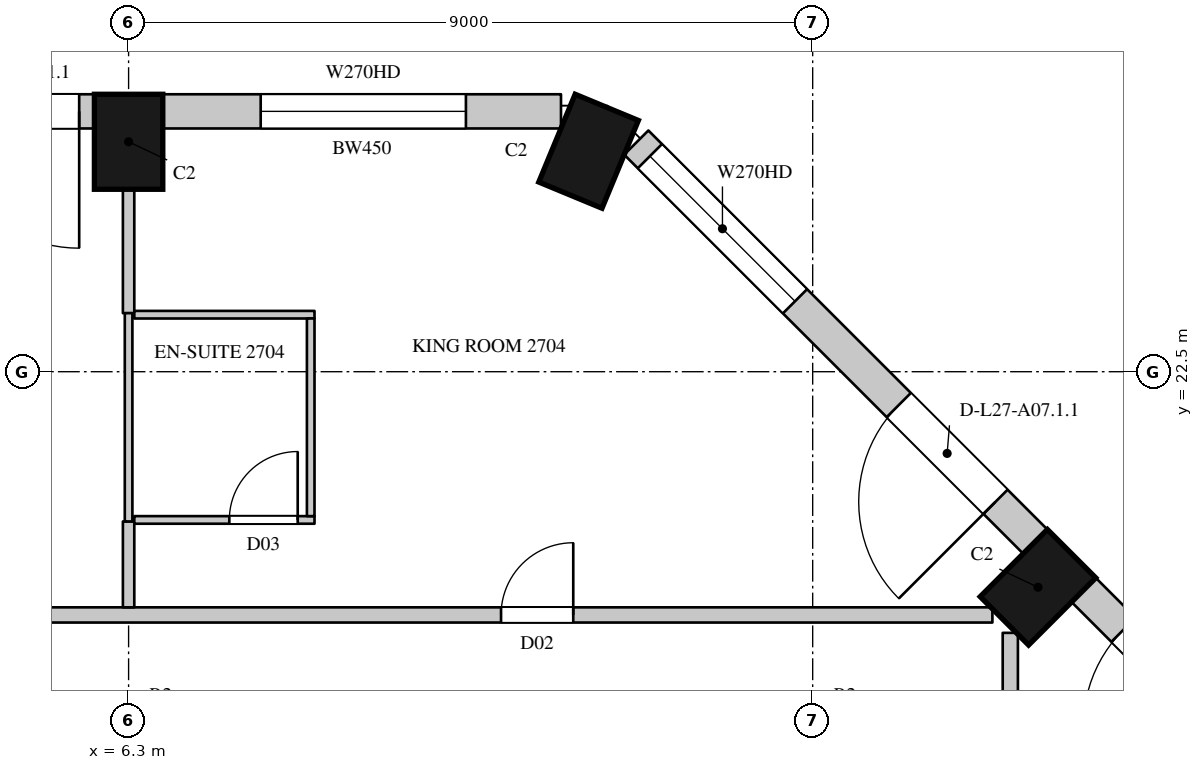
"""IFC4 building model, lengths in metres.
Left out: names, types, materials, properties, quantities, classifications, styles, units other than length and angle.
Written with IfcOpenShell. Run it as: python <this file> out.ifc"""

import sys

from ifc_helpers import new_model, si_unit, direction, frame, frame_2d, origin, origin_2d, place, context, subcontext, project, spatial, rectangle, extrude, element, fill, save


model = new_model("IFC4")
c1 = context("Model", 3, precision=1e-05, world=origin(), true_north=direction((0.0, 1.0)))
c2 = subcontext(c1, "Body", "Model", "MODEL_VIEW")
j1 = project(units=[si_unit("LENGTHUNIT", "METRE"), si_unit("PLANEANGLEUNIT", "RADIAN")], contexts=[c1])
p1 = place(None, origin())
s1 = spatial("IfcSite", under=j1, at=p1, CompositionType="ELEMENT")
p2 = place(p1, origin())
s2 = spatial("IfcBuilding", under=s1, at=p2, CompositionType="ELEMENT")
p3 = place(p2, frame((0.0, 0.0, 127.5)))
s3 = spatial("IfcBuildingStorey", under=s2, at=p3, CompositionType="ELEMENT", Elevation=127.5)
for number, where, z_axis, x_axis in (
    (1, (18.264, 19.664, 0.0), (0.0, 0.0, 1.0), (-0.707, 0.707, 0.0)),
    (2, (12.352, 25.4, 0.0), (0.0, 0.0, 1.0), (-0.924, 0.383, 0.0)),
    (3, (6.3, 25.525, 0.0), (0.0, 0.0, 1.0), (-1.0, 0.0, 0.0)),
):
    element("IfcColumn", number, at=place(p3, frame(where, z_axis=z_axis, x_axis=x_axis)), inside=s3, PredefinedType="COLUMN", context=c2, shape_type="SweptSolid", body=[
        extrude(rectangle(XDim=0.9, YDim=1.25, at=origin_2d()), origin(), (0.0, 0.0, 1.0), 3.6),
    ])
p4 = place(p3, frame((24.115, 14.379, 0.0), z_axis=(0.0, 0.0, 1.0), x_axis=(-0.707106781187, 0.707106781187, 0.0)))
e4 = element("IfcWall", 4, at=p4, inside=s3, PredefinedType="SOLIDWALL", context=c2, shape_type="SweptSolid", body=[
    extrude(rectangle(XDim=7.424, YDim=0.45, at=frame_2d((3.712, 0.0))), origin(), (0.0, 0.0, 1.0), 3.3),
])
p5 = place(p4, frame((0.253, 0.0, 1.05)))
e5 = element("IfcOpeningElement", 5, at=p5, cuts=e4, PredefinedType="OPENING", context=c2, shape_type="SweptSolid", body=[
    extrude(rectangle(XDim=2.7, YDim=2.0, at=frame_2d((1.35, 1.0))), frame((0.0, 0.235, 0.0), z_axis=(0.0, -1.0, 0.0), x_axis=(1.0, 0.0, 0.0)), (0.0, 0.0, 1.0), 0.47),
])
p6 = place(p4, frame((4.884, 0.0, 0.0)))
e6 = element("IfcOpeningElement", 6, at=p6, cuts=e4, PredefinedType="OPENING", context=c2, shape_type="SweptSolid", body=[
    extrude(rectangle(XDim=1.8, YDim=2.4, at=frame_2d((0.9, 1.2))), frame((0.0, 0.235, 0.0), z_axis=(0.0, -1.0, 0.0), x_axis=(1.0, 0.0, 0.0)), (0.0, 0.0, 1.0), 0.47),
])
p7 = place(p3, frame((18.229, 20.265, 0.0), z_axis=(0.0, 0.0, 1.0), x_axis=(-0.707106781187, 0.707106781187, 0.0)))
e7 = element("IfcWall", 7, at=p7, inside=s3, PredefinedType="SOLIDWALL", context=c2, shape_type="SweptSolid", body=[
    extrude(rectangle(XDim=7.424, YDim=0.45, at=frame_2d((3.712, 0.0))), origin(), (0.0, 0.0, 1.0), 3.3),
])
p8 = place(p7, frame((0.74, 0.0, 0.0)))
e8 = element("IfcOpeningElement", 8, at=p8, cuts=e7, PredefinedType="OPENING", context=c2, shape_type="SweptSolid", body=[
    extrude(rectangle(XDim=1.8, YDim=2.4, at=frame_2d((0.9, 1.2))), frame((0.0, 0.235, 0.0), z_axis=(0.0, -1.0, 0.0), x_axis=(1.0, 0.0, 0.0)), (0.0, 0.0, 1.0), 0.47),
])
p9 = place(p7, frame((4.471, 0.0, 1.05)))
e9 = element("IfcOpeningElement", 9, at=p9, cuts=e7, PredefinedType="OPENING", context=c2, shape_type="SweptSolid", body=[
    extrude(rectangle(XDim=2.7, YDim=2.0, at=frame_2d((1.35, 1.0))), frame((0.0, 0.235, 0.0), z_axis=(0.0, -1.0, 0.0), x_axis=(1.0, 0.0, 0.0)), (0.0, 0.0, 1.0), 0.47),
])
p10 = place(p3, frame((11.989, 25.925, 0.0), z_axis=(0.0, 0.0, 1.0), x_axis=(-1.0, 0.0, 0.0)))
e10 = element("IfcWall", 10, at=p10, inside=s3, PredefinedType="SOLIDWALL", context=c2, shape_type="SweptSolid", body=[
    extrude(rectangle(XDim=5.239, YDim=0.45, at=frame_2d((2.619, 0.0))), origin(), (0.0, 0.0, 1.0), 3.3),
])
p11 = place(p10, frame((1.251, 0.0, 1.05)))
e11 = element("IfcOpeningElement", 11, at=p11, cuts=e10, PredefinedType="OPENING", context=c2, shape_type="SweptSolid", body=[
    extrude(rectangle(XDim=2.7, YDim=2.0, at=frame_2d((1.35, 1.0))), frame((0.0, 0.235, 0.0), z_axis=(0.0, -1.0, 0.0), x_axis=(1.0, 0.0, 0.0)), (0.0, 0.0, 1.0), 0.47),
])
p12 = place(p3, frame((5.85, 25.925, 0.0), z_axis=(0.0, 0.0, 1.0), x_axis=(-1.0, 0.0, 0.0)))
e12 = element("IfcWall", 12, at=p12, inside=s3, PredefinedType="SOLIDWALL", context=c2, shape_type="SweptSolid", body=[
    extrude(rectangle(XDim=8.1, YDim=0.45, at=frame_2d((4.05, 0.0))), origin(), (0.0, 0.0, 1.0), 3.3),
])
p13 = place(p12, frame((0.2, 0.0, 0.0)))
e13 = element("IfcOpeningElement", 13, at=p13, cuts=e12, PredefinedType="OPENING", context=c2, shape_type="SweptSolid", body=[
    extrude(rectangle(XDim=1.8, YDim=2.4, at=frame_2d((0.9, 1.2))), frame((0.0, 0.235, 0.0), z_axis=(0.0, -1.0, 0.0), x_axis=(1.0, 0.0, 0.0)), (0.0, 0.0, 1.0), 0.47),
])
p14 = place(p12, frame((2.2, 0.0, 1.05)))
e14 = element("IfcOpeningElement", 14, at=p14, cuts=e12, PredefinedType="OPENING", context=c2, shape_type="SweptSolid", body=[
    extrude(rectangle(XDim=1.2, YDim=2.0, at=frame_2d((0.6, 1.0))), frame((0.0, 0.235, 0.0), z_axis=(0.0, -1.0, 0.0), x_axis=(1.0, 0.0, 0.0)), (0.0, 0.0, 1.0), 0.47),
])
p15 = place(p12, frame((4.7, 0.0, 0.0)))
e15 = element("IfcOpeningElement", 15, at=p15, cuts=e12, PredefinedType="OPENING", context=c2, shape_type="SweptSolid", body=[
    extrude(rectangle(XDim=1.8, YDim=2.4, at=frame_2d((0.9, 1.2))), frame((0.0, 0.235, 0.0), z_axis=(0.0, -1.0, 0.0), x_axis=(1.0, 0.0, 0.0)), (0.0, 0.0, 1.0), 0.47),
])
p16 = place(p12, frame((6.7, 0.0, 1.05)))
e16 = element("IfcOpeningElement", 16, at=p16, cuts=e12, PredefinedType="OPENING", context=c2, shape_type="SweptSolid", body=[
    extrude(rectangle(XDim=1.2, YDim=2.0, at=frame_2d((0.6, 1.0))), frame((0.0, 0.235, 0.0), z_axis=(0.0, -1.0, 0.0), x_axis=(1.0, 0.0, 0.0)), (0.0, 0.0, 1.0), 0.47),
])
p17 = place(p3, frame((19.937, 20.078, 0.0), z_axis=(0.0, 0.0, 1.0), x_axis=(-0.707106781187, 0.707106781187, 0.0)))
e17 = element("IfcWall", 17, at=p17, inside=s3, PredefinedType="SOLIDWALL", context=c2, shape_type="SweptSolid", body=[
    extrude(rectangle(XDim=1.781, YDim=0.45, at=frame_2d((0.89, 0.0))), origin(), (0.0, 0.0, 1.0), 0.6),
])
p18 = place(p3, frame((16.486, 23.529, 0.0), z_axis=(0.0, 0.0, 1.0), x_axis=(-0.707022305137, 0.707191247145, 0.0)))
e18 = element("IfcWall", 18, at=p18, inside=s3, PredefinedType="SOLIDWALL", context=c2, shape_type="SweptSolid", body=[
    extrude(rectangle(XDim=1.445, YDim=0.45, at=frame_2d((0.723, 0.0))), origin(), (0.0, 0.0, 1.0), 0.6),
])
p19 = place(p3, frame((-20.8, 19.3, 0.0), z_axis=(0.0, 0.0, 1.0), x_axis=(1.0, 0.0, 0.0)))
e19 = element("IfcWall", 19, at=p19, inside=s3, PredefinedType="PARTITIONING", context=c2, shape_type="SweptSolid", body=[
    extrude(rectangle(XDim=38.464, YDim=0.2, at=frame_2d((19.232, 0.0))), origin(), (0.0, 0.0, 1.0), 3.3),
])
p20 = place(p19, frame((24.05, 0.0, 0.0)))
e20 = element("IfcOpeningElement", 20, at=p20, cuts=e19, PredefinedType="OPENING", context=c2, shape_type="SweptSolid", body=[
    extrude(rectangle(XDim=0.9, YDim=2.2, at=frame_2d((0.45, 1.1))), frame((0.0, 0.11, 0.0), z_axis=(0.0, -1.0, 0.0), x_axis=(1.0, 0.0, 0.0)), (0.0, 0.0, 1.0), 0.22),
])
p21 = place(p19, frame((11.2, 0.0, 0.0)))
e21 = element("IfcOpeningElement", 21, at=p21, cuts=e19, PredefinedType="OPENING", context=c2, shape_type="SweptSolid", body=[
    extrude(rectangle(XDim=0.95, YDim=2.2, at=frame_2d((0.475, 1.1))), frame((0.0, 0.11, 0.0), z_axis=(0.0, -1.0, 0.0), x_axis=(1.0, 0.0, 0.0)), (0.0, 0.0, 1.0), 0.22),
])
p22 = place(p19, frame((15.05, 0.0, 0.0)))
e22 = element("IfcOpeningElement", 22, at=p22, cuts=e19, PredefinedType="OPENING", context=c2, shape_type="SweptSolid", body=[
    extrude(rectangle(XDim=0.95, YDim=2.2, at=frame_2d((0.475, 1.1))), frame((0.0, 0.11, 0.0), z_axis=(0.0, -1.0, 0.0), x_axis=(1.0, 0.0, 0.0)), (0.0, 0.0, 1.0), 0.22),
])
p23 = place(p19, frame((32.0, 0.0, 0.0)))
e23 = element("IfcOpeningElement", 23, at=p23, cuts=e19, PredefinedType="OPENING", context=c2, shape_type="SweptSolid", body=[
    extrude(rectangle(XDim=0.95, YDim=2.2, at=frame_2d((0.475, 1.1))), frame((0.0, 0.11, 0.0), z_axis=(0.0, -1.0, 0.0), x_axis=(1.0, 0.0, 0.0)), (0.0, 0.0, 1.0), 0.22),
])
p24 = place(p3, frame((17.9, 4.75, 0.0), z_axis=(0.0, 0.0, 1.0), x_axis=(0.0, 1.0, 0.0)))
e24 = element("IfcWall", 24, at=p24, inside=s3, PredefinedType="PARTITIONING", context=c2, shape_type="SweptSolid", body=[
    extrude(rectangle(XDim=14.314, YDim=0.2, at=frame_2d((7.157, 0.0))), origin(), (0.0, 0.0, 1.0), 3.3),
])
p25 = place(p24, frame((1.7, 0.0, 0.0)))
e25 = element("IfcOpeningElement", 25, at=p25, cuts=e24, PredefinedType="OPENING", context=c2, shape_type="SweptSolid", body=[
    extrude(rectangle(XDim=0.9, YDim=2.2, at=frame_2d((0.45, 1.1))), frame((0.0, 0.11, 0.0), z_axis=(0.0, -1.0, 0.0), x_axis=(1.0, 0.0, 0.0)), (0.0, 0.0, 1.0), 0.22),
])
p26 = place(p24, frame((10.2, 0.0, 0.0)))
e26 = element("IfcOpeningElement", 26, at=p26, cuts=e24, PredefinedType="OPENING", context=c2, shape_type="SweptSolid", body=[
    extrude(rectangle(XDim=0.95, YDim=2.2, at=frame_2d((0.475, 1.1))), frame((0.0, 0.11, 0.0), z_axis=(0.0, -1.0, 0.0), x_axis=(1.0, 0.0, 0.0)), (0.0, 0.0, 1.0), 0.22),
])
p27 = place(p3, frame((6.3, 19.4, 0.0), z_axis=(0.0, 0.0, 1.0), x_axis=(0.0, 1.0, 0.0)))
e27 = element("IfcWall", 27, at=p27, inside=s3, PredefinedType="PARTITIONING", context=c2, shape_type="SweptSolid", body=[
    extrude(rectangle(XDim=1.13, YDim=0.15, at=frame_2d((0.565, 0.0))), origin(), (0.0, 0.0, 1.0), 2.75),
])
p28 = place(p3, frame((6.3, 23.27, 0.0), z_axis=(0.0, 0.0, 1.0), x_axis=(0.0, 1.0, 0.0)))
e28 = element("IfcWall", 28, at=p28, inside=s3, PredefinedType="PARTITIONING", context=c2, shape_type="SweptSolid", body=[
    extrude(rectangle(XDim=1.63, YDim=0.15, at=frame_2d((0.815, 0.0))), origin(), (0.0, 0.0, 1.0), 2.75),
])
p29 = place(p3, frame((6.3, 20.53, 0.0), z_axis=(0.0, 0.0, 1.0), x_axis=(0.0, 1.0, 0.0)))
e29 = element("IfcWall", 29, at=p29, inside=s3, PredefinedType="PARTITIONING", context=c2, shape_type="SweptSolid", body=[
    extrude(rectangle(XDim=2.74, YDim=0.1, at=frame_2d((1.37, 0.0))), origin(), (0.0, 0.0, 1.0), 2.75),
])
p30 = place(p3, frame((6.375, 20.55, 0.0), z_axis=(0.0, 0.0, 1.0), x_axis=(1.0, 0.0, 0.0)))
e30 = element("IfcWall", 30, at=p30, inside=s3, PredefinedType="PARTITIONING", context=c2, shape_type="SweptSolid", body=[
    extrude(rectangle(XDim=2.371, YDim=0.1, at=frame_2d((1.186, 0.0))), origin(), (0.0, 0.0, 1.0), 3.3),
])
p31 = place(p30, frame((1.25, 0.0, 0.0)))
e31 = element("IfcOpeningElement", 31, at=p31, cuts=e30, PredefinedType="OPENING", context=c2, shape_type="SweptSolid", body=[
    extrude(rectangle(XDim=0.9, YDim=2.2, at=frame_2d((0.45, 1.1))), frame((0.0, 0.06, 0.0), z_axis=(0.0, -1.0, 0.0), x_axis=(1.0, 0.0, 0.0)), (0.0, 0.0, 1.0), 0.12),
])
p32 = place(p3, frame((6.375, 23.25, 0.0), z_axis=(0.0, 0.0, 1.0), x_axis=(1.0, 0.0, 0.0)))
e32 = element("IfcWall", 32, at=p32, inside=s3, PredefinedType="PARTITIONING", context=c2, shape_type="SweptSolid", body=[
    extrude(rectangle(XDim=2.371, YDim=0.1, at=frame_2d((1.186, 0.0))), origin(), (0.0, 0.0, 1.0), 3.3),
])
p33 = place(p3, frame((8.696, 20.6, 0.0), z_axis=(0.0, 0.0, 1.0), x_axis=(0.0, 1.0, 0.0)))
e33 = element("IfcWall", 33, at=p33, inside=s3, PredefinedType="PARTITIONING", context=c2, shape_type="SweptSolid", body=[
    extrude(rectangle(XDim=2.6, YDim=0.1, at=frame_2d((1.3, 0.0))), origin(), (0.0, 0.0, 1.0), 3.3),
])
p34 = place(p6, origin())
e34 = element("IfcDoor", 34, at=p34, inside=s3, OperationType="SLIDING_TO_LEFT", PredefinedType="DOOR", context=c2, shape_type="SweptSolid", body=[
    extrude(rectangle(XDim=1.8, YDim=2.4, at=frame_2d((0.9, 1.2))), frame((0.0, 0.13, 0.0), z_axis=(0.0, -1.0, 0.0), x_axis=(1.0, 0.0, 0.0)), (0.0, 0.0, 1.0), 0.05),
])
fill(e6, e34)
p35 = place(p8, origin())
e35 = element("IfcDoor", 35, at=p35, inside=s3, OperationType="SLIDING_TO_LEFT", PredefinedType="DOOR", context=c2, shape_type="SweptSolid", body=[
    extrude(rectangle(XDim=1.8, YDim=2.4, at=frame_2d((0.9, 1.2))), frame((0.0, 0.13, 0.0), z_axis=(0.0, -1.0, 0.0), x_axis=(1.0, 0.0, 0.0)), (0.0, 0.0, 1.0), 0.05),
])
fill(e8, e35)
p36 = place(p9, origin())
e36 = element("IfcWindow", 36, at=p36, inside=s3, PartitioningType="SINGLE_PANEL", PredefinedType="WINDOW", context=c2, shape_type="SweptSolid", body=[
    extrude(rectangle(XDim=2.7, YDim=2.0, at=frame_2d((1.35, 1.0))), frame((0.0, 0.135, 0.0), z_axis=(0.0, -1.0, 0.0), x_axis=(1.0, 0.0, 0.0)), (0.0, 0.0, 1.0), 0.06),
])
fill(e9, e36)
p37 = place(p11, origin())
e37 = element("IfcWindow", 37, at=p37, inside=s3, PartitioningType="SINGLE_PANEL", PredefinedType="WINDOW", context=c2, shape_type="SweptSolid", body=[
    extrude(rectangle(XDim=2.7, YDim=2.0, at=frame_2d((1.35, 1.0))), frame((0.0, 0.135, 0.0), z_axis=(0.0, -1.0, 0.0), x_axis=(1.0, 0.0, 0.0)), (0.0, 0.0, 1.0), 0.06),
])
fill(e11, e37)
p38 = place(p13, origin())
e38 = element("IfcDoor", 38, at=p38, inside=s3, OperationType="SLIDING_TO_LEFT", PredefinedType="DOOR", context=c2, shape_type="SweptSolid", body=[
    extrude(rectangle(XDim=1.8, YDim=2.4, at=frame_2d((0.9, 1.2))), frame((0.0, 0.13, 0.0), z_axis=(0.0, -1.0, 0.0), x_axis=(1.0, 0.0, 0.0)), (0.0, 0.0, 1.0), 0.05),
])
fill(e13, e38)
p39 = place(p23, origin())
e39 = element("IfcDoor", 39, at=p39, inside=s3, OperationType="SINGLE_SWING_RIGHT", PredefinedType="DOOR", context=c2, shape_type="SweptSolid", body=[
    extrude(rectangle(XDim=0.95, YDim=2.2, at=frame_2d((0.475, 1.1))), frame((0.0, 0.025, 0.0), z_axis=(0.0, -1.0, 0.0), x_axis=(1.0, 0.0, 0.0)), (0.0, 0.0, 1.0), 0.05),
])
fill(e23, e39)
p40 = place(p31, origin())
e40 = element("IfcDoor", 40, at=p40, inside=s3, OperationType="SINGLE_SWING_RIGHT", PredefinedType="DOOR", context=c2, shape_type="SweptSolid", body=[
    extrude(rectangle(XDim=0.9, YDim=2.2, at=frame_2d((0.45, 1.1))), frame((0.0, 0.025, 0.0), z_axis=(0.0, -1.0, 0.0), x_axis=(1.0, 0.0, 0.0)), (0.0, 0.0, 1.0), 0.05),
])
fill(e31, e40)
save(model, sys.argv[1])
